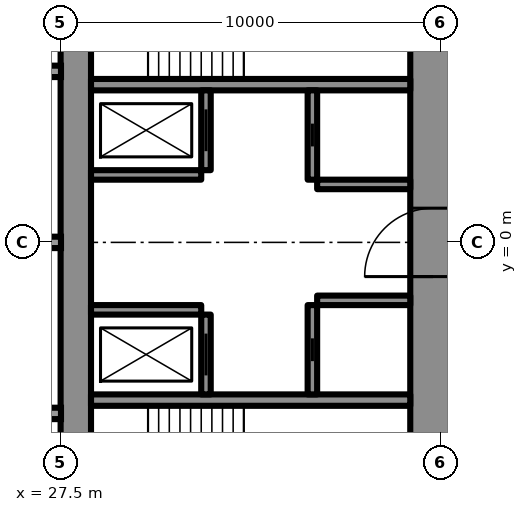
"""IFC4 building model, lengths in metres.
Left out: names, types, materials, properties, quantities, classifications, styles, units other than length and angle.
Written with IfcOpenShell. Run it as: python <this file> out.ifc"""

import sys

from ifc_helpers import new_model, si_unit, direction, frame, frame_2d, origin, place, context, subcontext, project, spatial, rectangle, extrude, element, fill, save


model = new_model("IFC4")
c1 = context("Model", 3, precision=1e-05, world=origin(), true_north=direction((0.0, 1.0)))
c2 = subcontext(c1, "Body", "Model", "MODEL_VIEW")
j1 = project(units=[si_unit("LENGTHUNIT", "METRE"), si_unit("PLANEANGLEUNIT", "RADIAN")], contexts=[c1])
p1 = place(None, origin())
s1 = spatial("IfcSite", under=j1, at=p1, CompositionType="ELEMENT")
p2 = place(p1, origin())
s2 = spatial("IfcBuilding", under=s1, at=p2, CompositionType="ELEMENT")
p3 = place(p2, frame((0.0, 0.0, 90.6)))
s3 = spatial("IfcBuildingStorey", under=s2, at=p3, CompositionType="ELEMENT", Elevation=90.6)
p4 = place(p3, frame((27.9, -8.6, 0.0), z_axis=(0.0, 0.0, 1.0), x_axis=(0.0, 1.0, 0.0)))
e1 = element("IfcWall", 1, at=p4, inside=s3, PredefinedType="SHEAR", context=c2, shape_type="SweptSolid", body=[
    extrude(rectangle(XDim=17.2, YDim=0.8, at=frame_2d((8.6, 0.0))), origin(), (0.0, 0.0, 1.0), 3.5),
])
p5 = place(p4, frame((2.45, 0.0, 0.6)))
e2 = element("IfcOpeningElement", 2, at=p5, cuts=e1, PredefinedType="OPENING", context=c2, shape_type="SweptSolid", body=[
    extrude(rectangle(XDim=0.6, YDim=2.1, at=frame_2d((0.3, 1.05))), frame((0.0, 0.41, 0.0), z_axis=(0.0, -1.0, 0.0), x_axis=(1.0, 0.0, 0.0)), (0.0, 0.0, 1.0), 0.82),
])
p6 = place(p4, frame((14.15, 0.0, 0.6)))
e3 = element("IfcOpeningElement", 3, at=p6, cuts=e1, PredefinedType="OPENING", context=c2, shape_type="SweptSolid", body=[
    extrude(rectangle(XDim=0.6, YDim=2.1, at=frame_2d((0.3, 1.05))), frame((0.0, 0.41, 0.0), z_axis=(0.0, -1.0, 0.0), x_axis=(1.0, 0.0, 0.0)), (0.0, 0.0, 1.0), 0.82),
])
p7 = place(p3, frame((37.3, -8.6, 0.0), z_axis=(0.0, 0.0, 1.0), x_axis=(0.0, 1.0, 0.0)))
e4 = element("IfcWall", 4, at=p7, inside=s3, PredefinedType="SHEAR", context=c2, shape_type="SweptSolid", body=[
    extrude(rectangle(XDim=17.2, YDim=1.2, at=frame_2d((8.6, 0.0))), origin(), (0.0, 0.0, 1.0), 3.5),
])
p8 = place(p7, frame((7.7, 0.0, 0.0)))
e5 = element("IfcOpeningElement", 5, at=p8, cuts=e4, PredefinedType="OPENING", context=c2, shape_type="SweptSolid", body=[
    extrude(rectangle(XDim=1.8, YDim=2.2, at=frame_2d((0.9, 1.1))), frame((0.0, 0.61, 0.0), z_axis=(0.0, -1.0, 0.0), x_axis=(1.0, 0.0, 0.0)), (0.0, 0.0, 1.0), 1.22),
])
for number, where, z_axis, x_axis in (
    (6, (28.3, -4.15, 0.0), (0.0, 0.0, 1.0), (1.0, 0.0, 0.0)),
    (7, (28.3, 4.15, 0.0), (0.0, 0.0, 1.0), (1.0, 0.0, 0.0)),
):
    element("IfcWall", number, at=place(p3, frame(where, z_axis=z_axis, x_axis=x_axis)), inside=s3, PredefinedType="SHEAR", context=c2, shape_type="SweptSolid", body=[
        extrude(rectangle(XDim=8.4, YDim=0.3, at=frame_2d((4.2, 0.0))), origin(), (0.0, 0.0, 1.0), 3.5),
    ])
p9 = place(p3, frame((31.325, -4.0, 0.0), z_axis=(0.0, 0.0, 1.0), x_axis=(0.0, 1.0, 0.0)))
e8 = element("IfcWall", 8, at=p9, inside=s3, PredefinedType="SHEAR", context=c2, shape_type="SweptSolid", body=[
    extrude(rectangle(XDim=2.1, YDim=0.25, at=frame_2d((1.05, 0.0))), origin(), (0.0, 0.0, 1.0), 3.5),
])
p10 = place(p9, frame((0.5, 0.0, 0.0)))
e9 = element("IfcOpeningElement", 9, at=p10, cuts=e8, PredefinedType="OPENING", context=c2, shape_type="SweptSolid", body=[
    extrude(rectangle(XDim=1.1, YDim=2.2, at=frame_2d((0.55, 1.1))), frame((0.0, 0.135, 0.0), z_axis=(0.0, -1.0, 0.0), x_axis=(1.0, 0.0, 0.0)), (0.0, 0.0, 1.0), 0.27),
])
p11 = place(p3, frame((34.125, -4.0, 0.0), z_axis=(0.0, 0.0, 1.0), x_axis=(0.0, 1.0, 0.0)))
e10 = element("IfcWall", 10, at=p11, inside=s3, PredefinedType="SHEAR", context=c2, shape_type="SweptSolid", body=[
    extrude(rectangle(XDim=2.35, YDim=0.25, at=frame_2d((1.175, 0.0))), origin(), (0.0, 0.0, 1.0), 3.5),
])
p12 = place(p11, frame((0.875, 0.0, 0.0)))
e11 = element("IfcOpeningElement", 11, at=p12, cuts=e10, PredefinedType="OPENING", context=c2, shape_type="SweptSolid", body=[
    extrude(rectangle(XDim=0.6, YDim=2.0, at=frame_2d((0.3, 1.0))), frame((0.0, 0.135, 0.0), z_axis=(0.0, -1.0, 0.0), x_axis=(1.0, 0.0, 0.0)), (0.0, 0.0, 1.0), 0.27),
])
p13 = place(p3, frame((28.3, -1.775, 0.0), z_axis=(0.0, 0.0, 1.0), x_axis=(1.0, 0.0, 0.0)))
e12 = element("IfcWall", 12, at=p13, inside=s3, PredefinedType="SHEAR", context=c2, shape_type="SweptSolid", body=[
    extrude(rectangle(XDim=2.9, YDim=0.25, at=frame_2d((1.45, 0.0))), origin(), (0.0, 0.0, 1.0), 3.5),
])
p14 = place(p3, frame((34.25, -1.525, 0.0), z_axis=(0.0, 0.0, 1.0), x_axis=(1.0, 0.0, 0.0)))
e13 = element("IfcWall", 13, at=p14, inside=s3, PredefinedType="SHEAR", context=c2, shape_type="SweptSolid", body=[
    extrude(rectangle(XDim=2.45, YDim=0.25, at=frame_2d((1.225, 0.0))), origin(), (0.0, 0.0, 1.0), 3.5),
])
p15 = place(p3, frame((31.325, 1.9, 0.0), z_axis=(0.0, 0.0, 1.0), x_axis=(0.0, 1.0, 0.0)))
e14 = element("IfcWall", 14, at=p15, inside=s3, PredefinedType="SHEAR", context=c2, shape_type="SweptSolid", body=[
    extrude(rectangle(XDim=2.1, YDim=0.25, at=frame_2d((1.05, 0.0))), origin(), (0.0, 0.0, 1.0), 3.5),
])
p16 = place(p15, frame((0.5, 0.0, 0.0)))
e15 = element("IfcOpeningElement", 15, at=p16, cuts=e14, PredefinedType="OPENING", context=c2, shape_type="SweptSolid", body=[
    extrude(rectangle(XDim=1.1, YDim=2.2, at=frame_2d((0.55, 1.1))), frame((0.0, 0.135, 0.0), z_axis=(0.0, -1.0, 0.0), x_axis=(1.0, 0.0, 0.0)), (0.0, 0.0, 1.0), 0.27),
])
p17 = place(p3, frame((34.125, 1.65, 0.0), z_axis=(0.0, 0.0, 1.0), x_axis=(0.0, 1.0, 0.0)))
e16 = element("IfcWall", 16, at=p17, inside=s3, PredefinedType="SHEAR", context=c2, shape_type="SweptSolid", body=[
    extrude(rectangle(XDim=2.35, YDim=0.25, at=frame_2d((1.175, 0.0))), origin(), (0.0, 0.0, 1.0), 3.5),
])
p18 = place(p17, frame((0.875, 0.0, 0.0)))
e17 = element("IfcOpeningElement", 17, at=p18, cuts=e16, PredefinedType="OPENING", context=c2, shape_type="SweptSolid", body=[
    extrude(rectangle(XDim=0.6, YDim=2.0, at=frame_2d((0.3, 1.0))), frame((0.0, 0.135, 0.0), z_axis=(0.0, -1.0, 0.0), x_axis=(1.0, 0.0, 0.0)), (0.0, 0.0, 1.0), 0.27),
])
p19 = place(p3, frame((28.3, 1.775, 0.0), z_axis=(0.0, 0.0, 1.0), x_axis=(1.0, 0.0, 0.0)))
e18 = element("IfcWall", 18, at=p19, inside=s3, PredefinedType="SHEAR", context=c2, shape_type="SweptSolid", body=[
    extrude(rectangle(XDim=2.9, YDim=0.25, at=frame_2d((1.45, 0.0))), origin(), (0.0, 0.0, 1.0), 3.5),
])
p20 = place(p3, frame((34.25, 1.525, 0.0), z_axis=(0.0, 0.0, 1.0), x_axis=(1.0, 0.0, 0.0)))
e19 = element("IfcWall", 19, at=p20, inside=s3, PredefinedType="SHEAR", context=c2, shape_type="SweptSolid", body=[
    extrude(rectangle(XDim=2.45, YDim=0.25, at=frame_2d((1.225, 0.0))), origin(), (0.0, 0.0, 1.0), 3.5),
])
p21 = place(p3, frame((27.2, -13.8, 0.0), z_axis=(0.0, 0.0, 1.0), x_axis=(0.866027159892, 0.499996958321, 0.0)))
e20 = element("IfcWall", 20, at=p21, inside=s3, PredefinedType="SHEAR", context=c2, shape_type="SweptSolid", body=[
    extrude(rectangle(XDim=27.947, YDim=1.2, at=frame_2d((13.973, 0.0))), origin(), (0.0, 0.0, 1.0), 3.5),
])
p22 = place(p21, frame((4.6, 0.0, 0.0)))
e21 = element("IfcOpeningElement", 21, at=p22, cuts=e20, PredefinedType="OPENING", context=c2, shape_type="SweptSolid", body=[
    extrude(rectangle(XDim=1.0, YDim=2.2, at=frame_2d((0.5, 1.1))), frame((0.0, 0.61, 0.0), z_axis=(0.0, -1.0, 0.0), x_axis=(1.0, 0.0, 0.0)), (0.0, 0.0, 1.0), 1.22),
])
p23 = place(p21, frame((13.395, 0.0, 0.0)))
e22 = element("IfcOpeningElement", 22, at=p23, cuts=e20, PredefinedType="OPENING", context=c2, shape_type="SweptSolid", body=[
    extrude(rectangle(XDim=1.8, YDim=2.2, at=frame_2d((0.9, 1.1))), frame((0.0, 0.61, 0.0), z_axis=(0.0, -1.0, 0.0), x_axis=(1.0, 0.0, 0.0)), (0.0, 0.0, 1.0), 1.22),
])
p24 = place(p3, frame((27.2, 13.8, 0.0), z_axis=(0.0, 0.0, 1.0), x_axis=(0.866024515034, -0.500001539357, 0.0)))
e23 = element("IfcWall", 23, at=p24, inside=s3, PredefinedType="SHEAR", context=c2, shape_type="SweptSolid", body=[
    extrude(rectangle(XDim=26.907, YDim=1.2, at=frame_2d((13.454, 0.0))), origin(), (0.0, 0.0, 1.0), 3.5),
])
p25 = place(p24, frame((4.6, 0.0, 0.0)))
e24 = element("IfcOpeningElement", 24, at=p25, cuts=e23, PredefinedType="OPENING", context=c2, shape_type="SweptSolid", body=[
    extrude(rectangle(XDim=1.0, YDim=2.2, at=frame_2d((0.5, 1.1))), frame((0.0, 0.61, 0.0), z_axis=(0.0, -1.0, 0.0), x_axis=(1.0, 0.0, 0.0)), (0.0, 0.0, 1.0), 1.22),
])
p26 = place(p24, frame((13.395, 0.0, 0.0)))
e25 = element("IfcOpeningElement", 25, at=p26, cuts=e23, PredefinedType="OPENING", context=c2, shape_type="SweptSolid", body=[
    extrude(rectangle(XDim=1.8, YDim=2.2, at=frame_2d((0.9, 1.1))), frame((0.0, 0.61, 0.0), z_axis=(0.0, -1.0, 0.0), x_axis=(1.0, 0.0, 0.0)), (0.0, 0.0, 1.0), 1.22),
])
p27 = place(p3, frame((36.834, 10.894, 0.0), z_axis=(0.0, 0.0, 1.0), x_axis=(0.866028157229, -0.499995230863, 0.0)))
e26 = element("IfcWall", 26, at=p27, inside=s3, PredefinedType="PARTITIONING", context=c2, shape_type="SweptSolid", body=[
    extrude(rectangle(XDim=21.667, YDim=0.2, at=frame_2d((10.833, 0.0))), origin(), (0.0, 0.0, 1.0), 3.25),
])
p28 = place(p27, frame((14.04, 0.0, 0.0)))
e27 = element("IfcOpeningElement", 27, at=p28, cuts=e26, PredefinedType="OPENING", context=c2, shape_type="SweptSolid", body=[
    extrude(rectangle(XDim=0.95, YDim=2.2, at=frame_2d((0.475, 1.1))), frame((0.0, 0.11, 0.0), z_axis=(0.0, -1.0, 0.0), x_axis=(1.0, 0.0, 0.0)), (0.0, 0.0, 1.0), 0.22),
])
p29 = place(p27, frame((9.99, 0.0, 0.0)))
e28 = element("IfcOpeningElement", 28, at=p29, cuts=e26, PredefinedType="OPENING", context=c2, shape_type="SweptSolid", body=[
    extrude(rectangle(XDim=0.95, YDim=2.2, at=frame_2d((0.475, 1.1))), frame((0.0, 0.11, 0.0), z_axis=(0.0, -1.0, 0.0), x_axis=(1.0, 0.0, 0.0)), (0.0, 0.0, 1.0), 0.22),
])
p30 = place(p27, frame((3.35, 0.0, 0.0)))
e29 = element("IfcOpeningElement", 29, at=p30, cuts=e26, PredefinedType="OPENING", context=c2, shape_type="SweptSolid", body=[
    extrude(rectangle(XDim=1.0, YDim=2.2, at=frame_2d((0.5, 1.1))), frame((0.0, 0.11, 0.0), z_axis=(0.0, -1.0, 0.0), x_axis=(1.0, 0.0, 0.0)), (0.0, 0.0, 1.0), 0.22),
])
p31 = place(p8, origin())
e30 = element("IfcDoor", 30, at=p31, inside=s3, OperationType="DOUBLE_DOOR_SINGLE_SWING", PredefinedType="DOOR", context=c2, shape_type="SweptSolid", body=[
    extrude(rectangle(XDim=1.8, YDim=2.2, at=frame_2d((0.9, 1.1))), frame((0.0, 0.025, 0.0), z_axis=(0.0, -1.0, 0.0), x_axis=(1.0, 0.0, 0.0)), (0.0, 0.0, 1.0), 0.05),
])
fill(e5, e30)
p32 = place(p10, origin())
e31 = element("IfcDoor", 31, at=p32, inside=s3, OperationType="SLIDING_TO_LEFT", PredefinedType="USERDEFINED", context=c2, shape_type="SweptSolid", body=[
    extrude(rectangle(XDim=1.1, YDim=2.2, at=frame_2d((0.55, 1.1))), frame((0.0, 0.025, 0.0), z_axis=(0.0, -1.0, 0.0), x_axis=(1.0, 0.0, 0.0)), (0.0, 0.0, 1.0), 0.05),
])
fill(e9, e31)
p33 = place(p16, origin())
e32 = element("IfcDoor", 32, at=p33, inside=s3, OperationType="SLIDING_TO_LEFT", PredefinedType="USERDEFINED", context=c2, shape_type="SweptSolid", body=[
    extrude(rectangle(XDim=1.1, YDim=2.2, at=frame_2d((0.55, 1.1))), frame((0.0, 0.025, 0.0), z_axis=(0.0, -1.0, 0.0), x_axis=(1.0, 0.0, 0.0)), (0.0, 0.0, 1.0), 0.05),
])
fill(e15, e32)
p34 = place(p12, origin())
e33 = element("IfcDoor", 33, at=p34, inside=s3, OperationType="SLIDING_TO_LEFT", PredefinedType="DOOR", context=c2, shape_type="SweptSolid", body=[
    extrude(rectangle(XDim=0.6, YDim=2.0, at=frame_2d((0.3, 1.0))), frame((0.0, 0.025, 0.0), z_axis=(0.0, -1.0, 0.0), x_axis=(1.0, 0.0, 0.0)), (0.0, 0.0, 1.0), 0.05),
])
fill(e11, e33)
p35 = place(p18, origin())
e34 = element("IfcDoor", 34, at=p35, inside=s3, OperationType="SLIDING_TO_LEFT", PredefinedType="DOOR", context=c2, shape_type="SweptSolid", body=[
    extrude(rectangle(XDim=0.6, YDim=2.0, at=frame_2d((0.3, 1.0))), frame((0.0, 0.025, 0.0), z_axis=(0.0, -1.0, 0.0), x_axis=(1.0, 0.0, 0.0)), (0.0, 0.0, 1.0), 0.05),
])
fill(e17, e34)
save(model, sys.argv[1])
